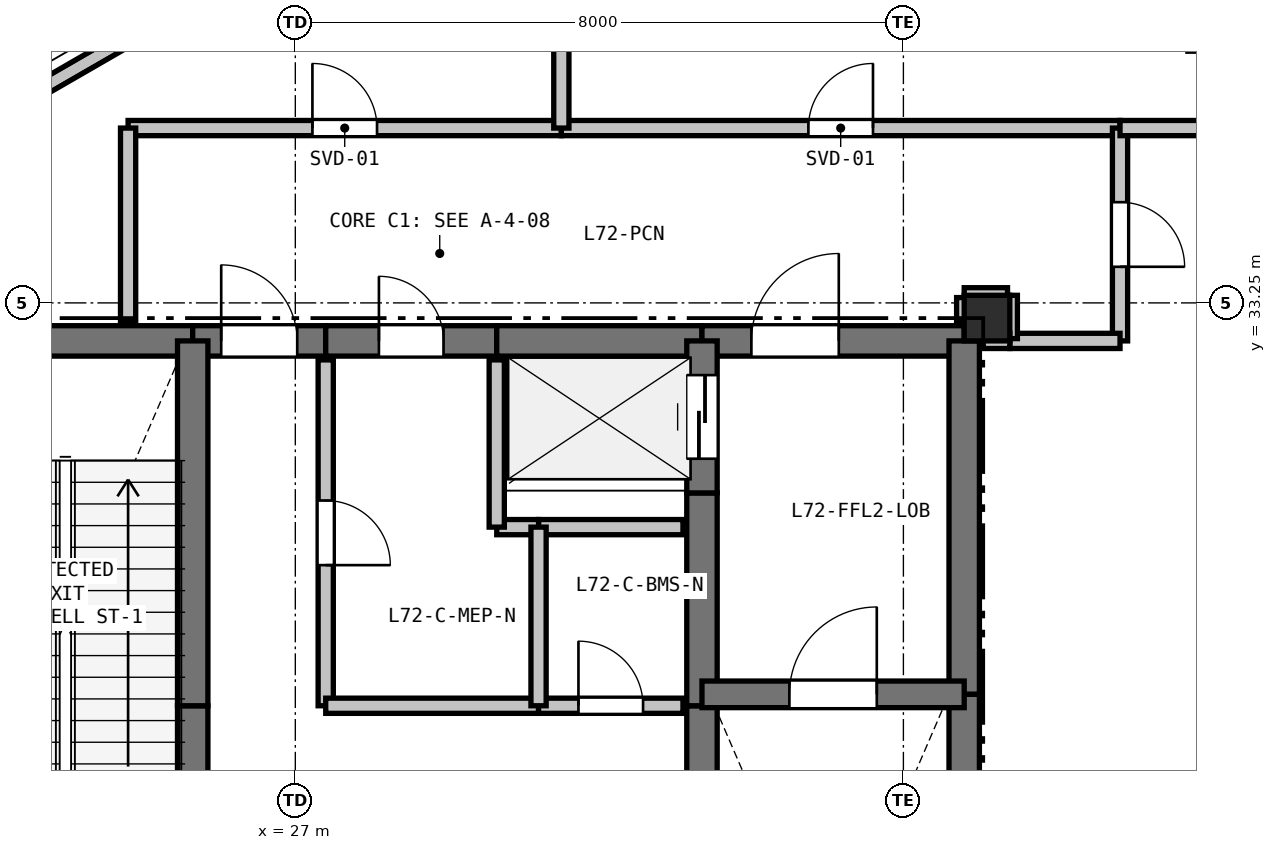
"""IFC4 building model, lengths in metres.
Left out: names, types, materials, properties, quantities, classifications, styles, units other than length and angle.
Written with IfcOpenShell. Run it as: python <this file> out.ifc"""

import sys

from ifc_helpers import new_model, si_unit, direction, frame, frame_2d, origin, origin_2d, place, context, subcontext, project, spatial, rectangle, extrude, element, fill, save


model = new_model("IFC4")
c1 = context("Model", 3, precision=1e-05, world=origin(), true_north=direction((0.0, 1.0)))
c2 = subcontext(c1, "Body", "Model", "MODEL_VIEW")
j1 = project(units=[si_unit("LENGTHUNIT", "METRE"), si_unit("PLANEANGLEUNIT", "RADIAN")], contexts=[c1])
p1 = place(None, origin())
s1 = spatial("IfcSite", under=j1, at=p1, CompositionType="ELEMENT")
p2 = place(p1, origin())
s2 = spatial("IfcBuilding", under=s1, at=p2, CompositionType="ELEMENT")
p3 = place(p2, frame((0.0, 0.0, 258.6)))
s3 = spatial("IfcBuildingStorey", under=s2, at=p3, CompositionType="ELEMENT", Elevation=258.6)
p4 = place(p3, frame((36.1, 33.05, 0.0), z_axis=(0.0, 0.0, 1.0), x_axis=(1.0, 0.0, 0.0)))
e1 = element("IfcColumn", 1, at=p4, inside=s3, PredefinedType="COLUMN", context=c2, shape_type="SweptSolid", body=[
    extrude(rectangle(XDim=0.6, YDim=0.6, at=origin_2d()), origin(), (0.0, 0.0, 1.0), 5.4),
])
p5 = place(p3, frame((20.066, 33.997, 0.0), z_axis=(0.0, 0.0, 1.0), x_axis=(0.866019557082, 0.500010126649, 0.0)))
e2 = element("IfcWall", 2, at=p5, inside=s3, PredefinedType="PARAPET", context=c2, shape_type="SweptSolid", body=[
    extrude(rectangle(XDim=8.228, YDim=0.2, at=frame_2d((4.114, 0.0))), origin(), (0.0, 0.0, 1.0), 0.2),
])
p6 = place(p3, frame((22.2, 32.75, 0.0), z_axis=(0.0, 0.0, 1.0), x_axis=(1.0, 0.0, 0.0)))
e3 = element("IfcWall", 3, at=p6, inside=s3, PredefinedType="SHEAR", context=c2, shape_type="SweptSolid", body=[
    extrude(rectangle(XDim=3.45, YDim=0.4, at=frame_2d((1.725, 0.0))), origin(), (0.0, 0.0, 1.0), 5.08),
])
p7 = place(p3, frame((25.65, 32.75, 0.0), z_axis=(0.0, 0.0, 1.0), x_axis=(1.0, 0.0, 0.0)))
e4 = element("IfcWall", 4, at=p7, inside=s3, PredefinedType="SHEAR", context=c2, shape_type="SweptSolid", body=[
    extrude(rectangle(XDim=1.75, YDim=0.4, at=frame_2d((0.875, 0.0))), origin(), (0.0, 0.0, 1.0), 5.08),
])
p8 = place(p7, frame((0.375, 0.0, 0.0)))
e5 = element("IfcOpeningElement", 5, at=p8, cuts=e4, PredefinedType="OPENING", context=c2, shape_type="SweptSolid", body=[
    extrude(rectangle(XDim=1.0, YDim=2.15, at=frame_2d((0.5, 1.075))), frame((0.0, 0.21, 0.0), z_axis=(0.0, -1.0, 0.0), x_axis=(1.0, 0.0, 0.0)), (0.0, 0.0, 1.0), 0.42),
])
p9 = place(p3, frame((27.4, 32.75, 0.0), z_axis=(0.0, 0.0, 1.0), x_axis=(1.0, 0.0, 0.0)))
e6 = element("IfcWall", 6, at=p9, inside=s3, PredefinedType="SHEAR", context=c2, shape_type="SweptSolid", body=[
    extrude(rectangle(XDim=2.25, YDim=0.4, at=frame_2d((1.125, 0.0))), origin(), (0.0, 0.0, 1.0), 5.08),
])
p10 = place(p9, frame((0.7, 0.0, 0.0)))
e7 = element("IfcOpeningElement", 7, at=p10, cuts=e6, PredefinedType="OPENING", context=c2, shape_type="SweptSolid", body=[
    extrude(rectangle(XDim=0.85, YDim=2.1, at=frame_2d((0.425, 1.05))), frame((0.0, 0.21, 0.0), z_axis=(0.0, -1.0, 0.0), x_axis=(1.0, 0.0, 0.0)), (0.0, 0.0, 1.0), 0.42),
])
p11 = place(p3, frame((29.65, 32.75, 0.0), z_axis=(0.0, 0.0, 1.0), x_axis=(1.0, 0.0, 0.0)))
e8 = element("IfcWall", 8, at=p11, inside=s3, PredefinedType="SHEAR", context=c2, shape_type="SweptSolid", body=[
    extrude(rectangle(XDim=2.7, YDim=0.4, at=frame_2d((1.35, 0.0))), origin(), (0.0, 0.0, 1.0), 5.08),
])
p12 = place(p3, frame((32.35, 32.75, 0.0), z_axis=(0.0, 0.0, 1.0), x_axis=(1.0, 0.0, 0.0)))
e9 = element("IfcWall", 9, at=p12, inside=s3, PredefinedType="SHEAR", context=c2, shape_type="SweptSolid", body=[
    extrude(rectangle(XDim=3.45, YDim=0.4, at=frame_2d((1.725, 0.0))), origin(), (0.0, 0.0, 1.0), 5.08),
])
p13 = place(p12, frame((0.65, 0.0, 0.0)))
e10 = element("IfcOpeningElement", 10, at=p13, cuts=e9, PredefinedType="OPENING", context=c2, shape_type="SweptSolid", body=[
    extrude(rectangle(XDim=1.15, YDim=2.15, at=frame_2d((0.575, 1.075))), frame((0.0, 0.21, 0.0), z_axis=(0.0, -1.0, 0.0), x_axis=(1.0, 0.0, 0.0)), (0.0, 0.0, 1.0), 0.42),
])
p14 = place(p3, frame((35.8, 32.75, 0.0), z_axis=(0.0, 0.0, 1.0), x_axis=(0.0, -1.0, 0.0)))
e11 = element("IfcWall", 11, at=p14, inside=s3, PredefinedType="SHEAR", context=c2, shape_type="SweptSolid", body=[
    extrude(rectangle(XDim=4.65, YDim=0.4, at=frame_2d((2.325, 0.0))), origin(), (0.0, 0.0, 1.0), 5.08),
])
p15 = place(p3, frame((35.8, 28.1, 0.0), z_axis=(0.0, 0.0, 1.0), x_axis=(0.0, -1.0, 0.0)))
e12 = element("IfcWall", 12, at=p15, inside=s3, PredefinedType="SHEAR", context=c2, shape_type="SweptSolid", body=[
    extrude(rectangle(XDim=7.35, YDim=0.4, at=frame_2d((3.675, 0.0))), origin(), (0.0, 0.0, 1.0), 5.08),
])
p16 = place(p3, frame((25.65, 25.55, 0.0), z_axis=(0.0, 0.0, 1.0), x_axis=(0.0, 1.0, 0.0)))
e13 = element("IfcWall", 13, at=p16, inside=s3, PredefinedType="SHEAR", context=c2, shape_type="SweptSolid", body=[
    extrude(rectangle(XDim=2.4, YDim=0.4, at=frame_2d((1.2, 0.0))), origin(), (0.0, 0.0, 1.0), 5.08),
])
p17 = place(p3, frame((25.65, 27.95, 0.0), z_axis=(0.0, 0.0, 1.0), x_axis=(0.0, 1.0, 0.0)))
e14 = element("IfcWall", 14, at=p17, inside=s3, PredefinedType="SHEAR", context=c2, shape_type="SweptSolid", body=[
    extrude(rectangle(XDim=4.8, YDim=0.4, at=frame_2d((2.4, 0.0))), origin(), (0.0, 0.0, 1.0), 5.08),
])
p18 = place(p3, frame((32.35, 25.55, 0.0), z_axis=(0.0, 0.0, 1.0), x_axis=(0.0, 1.0, 0.0)))
e15 = element("IfcWall", 15, at=p18, inside=s3, PredefinedType="SHEAR", context=c2, shape_type="SweptSolid", body=[
    extrude(rectangle(XDim=2.4, YDim=0.4, at=frame_2d((1.2, 0.0))), origin(), (0.0, 0.0, 1.0), 5.08),
])
p19 = place(p3, frame((32.35, 27.95, 0.0), z_axis=(0.0, 0.0, 1.0), x_axis=(0.0, 1.0, 0.0)))
e16 = element("IfcWall", 16, at=p19, inside=s3, PredefinedType="SHEAR", context=c2, shape_type="SweptSolid", body=[
    extrude(rectangle(XDim=2.8, YDim=0.4, at=frame_2d((1.4, 0.0))), origin(), (0.0, 0.0, 1.0), 5.08),
])
p20 = place(p3, frame((32.35, 30.75, 0.0), z_axis=(0.0, 0.0, 1.0), x_axis=(0.0, 1.0, 0.0)))
e17 = element("IfcWall", 17, at=p20, inside=s3, PredefinedType="SHEAR", context=c2, shape_type="SweptSolid", body=[
    extrude(rectangle(XDim=2.0, YDim=0.4, at=frame_2d((1.0, 0.0))), origin(), (0.0, 0.0, 1.0), 5.08),
])
p21 = place(p20, frame((0.45, 0.0, 0.0)))
e18 = element("IfcOpeningElement", 18, at=p21, cuts=e17, PredefinedType="OPENING", context=c2, shape_type="SweptSolid", body=[
    extrude(rectangle(XDim=1.1, YDim=2.15, at=frame_2d((0.55, 1.075))), frame((0.0, 0.21, 0.0), z_axis=(0.0, -1.0, 0.0), x_axis=(1.0, 0.0, 0.0)), (0.0, 0.0, 1.0), 0.42),
])
p22 = place(p3, frame((32.35, 28.1, 0.0), z_axis=(0.0, 0.0, 1.0), x_axis=(1.0, 0.0, 0.0)))
e19 = element("IfcWall", 19, at=p22, inside=s3, PredefinedType="SHEAR", context=c2, shape_type="SweptSolid", body=[
    extrude(rectangle(XDim=3.45, YDim=0.35, at=frame_2d((1.725, 0.0))), origin(), (0.0, 0.0, 1.0), 5.08),
])
p23 = place(p22, frame((1.15, 0.0, 0.0)))
e20 = element("IfcOpeningElement", 20, at=p23, cuts=e19, PredefinedType="OPENING", context=c2, shape_type="SweptSolid", body=[
    extrude(rectangle(XDim=1.15, YDim=2.15, at=frame_2d((0.575, 1.075))), frame((0.0, 0.185, 0.0), z_axis=(0.0, -1.0, 0.0), x_axis=(1.0, 0.0, 0.0)), (0.0, 0.0, 1.0), 0.37),
])
p24 = place(p3, frame((32.1, 30.3, 0.0), z_axis=(0.0, 0.0, 1.0), x_axis=(-1.0, 0.0, 0.0)))
e21 = element("IfcWall", 21, at=p24, inside=s3, PredefinedType="PARTITIONING", context=c2, shape_type="SweptSolid", body=[
    extrude(rectangle(XDim=1.9, YDim=0.2, at=frame_2d((0.95, 0.0))), origin(), (0.0, 0.0, 1.0), 5.08),
])
p25 = place(p3, frame((30.2, 30.3, 0.0), z_axis=(0.0, 0.0, 1.0), x_axis=(-1.0, 0.0, 0.0)))
e22 = element("IfcWall", 22, at=p25, inside=s3, PredefinedType="PARTITIONING", context=c2, shape_type="SweptSolid", body=[
    extrude(rectangle(XDim=0.55, YDim=0.2, at=frame_2d((0.275, 0.0))), origin(), (0.0, 0.0, 1.0), 5.08),
])
p26 = place(p3, frame((29.65, 30.3, 0.0), z_axis=(0.0, 0.0, 1.0), x_axis=(0.0, 1.0, 0.0)))
e23 = element("IfcWall", 23, at=p26, inside=s3, PredefinedType="PARTITIONING", context=c2, shape_type="SweptSolid", body=[
    extrude(rectangle(XDim=2.2, YDim=0.2, at=frame_2d((1.1, 0.0))), origin(), (0.0, 0.0, 1.0), 5.08),
])
p27 = place(p3, frame((27.4, 32.5, 0.0), z_axis=(0.0, 0.0, 1.0), x_axis=(0.0, -1.0, 0.0)))
e24 = element("IfcWall", 24, at=p27, inside=s3, PredefinedType="PARTITIONING", context=c2, shape_type="SweptSolid", body=[
    extrude(rectangle(XDim=4.55, YDim=0.2, at=frame_2d((2.275, 0.0))), origin(), (0.0, 0.0, 1.0), 5.08),
])
p28 = place(p27, frame((1.85, 0.0, 0.0)))
e25 = element("IfcOpeningElement", 25, at=p28, cuts=e24, PredefinedType="OPENING", context=c2, shape_type="SweptSolid", body=[
    extrude(rectangle(XDim=0.85, YDim=2.1, at=frame_2d((0.425, 1.05))), frame((0.0, 0.11, 0.0), z_axis=(0.0, -1.0, 0.0), x_axis=(1.0, 0.0, 0.0)), (0.0, 0.0, 1.0), 0.22),
])
p29 = place(p3, frame((27.4, 27.95, 0.0), z_axis=(0.0, 0.0, 1.0), x_axis=(1.0, 0.0, 0.0)))
e26 = element("IfcWall", 26, at=p29, inside=s3, PredefinedType="PARTITIONING", context=c2, shape_type="SweptSolid", body=[
    extrude(rectangle(XDim=2.8, YDim=0.2, at=frame_2d((1.4, 0.0))), origin(), (0.0, 0.0, 1.0), 5.08),
])
p30 = place(p3, frame((30.2, 27.95, 0.0), z_axis=(0.0, 0.0, 1.0), x_axis=(1.0, 0.0, 0.0)))
e27 = element("IfcWall", 27, at=p30, inside=s3, PredefinedType="PARTITIONING", context=c2, shape_type="SweptSolid", body=[
    extrude(rectangle(XDim=1.9, YDim=0.2, at=frame_2d((0.95, 0.0))), origin(), (0.0, 0.0, 1.0), 5.08),
])
p31 = place(p30, frame((0.525, 0.0, 0.0)))
e28 = element("IfcOpeningElement", 28, at=p31, cuts=e27, PredefinedType="OPENING", context=c2, shape_type="SweptSolid", body=[
    extrude(rectangle(XDim=0.85, YDim=2.1, at=frame_2d((0.425, 1.05))), frame((0.0, 0.11, 0.0), z_axis=(0.0, -1.0, 0.0), x_axis=(1.0, 0.0, 0.0)), (0.0, 0.0, 1.0), 0.22),
])
p32 = place(p3, frame((24.8, 35.55, 0.0), z_axis=(0.0, 0.0, 1.0), x_axis=(1.0, 0.0, 0.0)))
e29 = element("IfcWall", 29, at=p32, inside=s3, PredefinedType="PARTITIONING", context=c2, shape_type="SweptSolid", body=[
    extrude(rectangle(XDim=5.7, YDim=0.2, at=frame_2d((2.85, 0.0))), origin(), (0.0, 0.0, 1.0), 5.08),
])
p33 = place(p32, frame((2.425, 0.0, 0.0)))
e30 = element("IfcOpeningElement", 30, at=p33, cuts=e29, PredefinedType="OPENING", context=c2, shape_type="SweptSolid", body=[
    extrude(rectangle(XDim=0.85, YDim=2.1, at=frame_2d((0.425, 1.05))), frame((0.0, 0.11, 0.0), z_axis=(0.0, -1.0, 0.0), x_axis=(1.0, 0.0, 0.0)), (0.0, 0.0, 1.0), 0.22),
])
p34 = place(p3, frame((30.5, 35.55, 0.0), z_axis=(0.0, 0.0, 1.0), x_axis=(1.0, 0.0, 0.0)))
e31 = element("IfcWall", 31, at=p34, inside=s3, PredefinedType="PARTITIONING", context=c2, shape_type="SweptSolid", body=[
    extrude(rectangle(XDim=7.35, YDim=0.2, at=frame_2d((3.675, 0.0))), origin(), (0.0, 0.0, 1.0), 4.528),
])
p35 = place(p34, frame((3.25, 0.0, 0.0)))
e32 = element("IfcOpeningElement", 32, at=p35, cuts=e31, PredefinedType="OPENING", context=c2, shape_type="SweptSolid", body=[
    extrude(rectangle(XDim=0.85, YDim=2.1, at=frame_2d((0.425, 1.05))), frame((0.0, 0.11, 0.0), z_axis=(0.0, -1.0, 0.0), x_axis=(1.0, 0.0, 0.0)), (0.0, 0.0, 1.0), 0.22),
])
p36 = place(p3, frame((37.85, 35.55, 0.0), z_axis=(0.0, 0.0, 1.0), x_axis=(0.0, -1.0, 0.0)))
e33 = element("IfcWall", 33, at=p36, inside=s3, PredefinedType="PARTITIONING", context=c2, shape_type="SweptSolid", body=[
    extrude(rectangle(XDim=2.8, YDim=0.2, at=frame_2d((1.4, 0.0))), origin(), (0.0, 0.0, 1.0), 4.528),
])
p37 = place(p36, frame((0.975, 0.0, 0.0)))
e34 = element("IfcOpeningElement", 34, at=p37, cuts=e33, PredefinedType="OPENING", context=c2, shape_type="SweptSolid", body=[
    extrude(rectangle(XDim=0.85, YDim=2.1, at=frame_2d((0.425, 1.05))), frame((0.0, 0.11, 0.0), z_axis=(0.0, -1.0, 0.0), x_axis=(1.0, 0.0, 0.0)), (0.0, 0.0, 1.0), 0.22),
])
p38 = place(p3, frame((37.85, 32.75, 0.0), z_axis=(0.0, 0.0, 1.0), x_axis=(-1.0, 0.0, 0.0)))
e35 = element("IfcWall", 35, at=p38, inside=s3, PredefinedType="PARTITIONING", context=c2, shape_type="SweptSolid", body=[
    extrude(rectangle(XDim=1.45, YDim=0.2, at=frame_2d((0.725, 0.0))), origin(), (0.0, 0.0, 1.0), 5.08),
])
for number, where, z_axis, x_axis in (
    (36, (36.4, 32.78, 0.0), (0.0, 0.0, 1.0), (0.0, 1.0, 0.0)),
    (37, (36.37, 33.35, 0.0), (0.0, 0.0, 1.0), (-1.0, 0.0, 0.0)),
):
    element("IfcWall", number, at=place(p3, frame(where, z_axis=z_axis, x_axis=x_axis)), inside=s3, PredefinedType="PARTITIONING", context=c2, shape_type="SweptSolid", body=[
        extrude(rectangle(XDim=0.57, YDim=0.2, at=frame_2d((0.285, 0.0))), origin(), (0.0, 0.0, 1.0), 4.528),
    ])
p39 = place(p3, frame((35.8, 33.32, 0.0), z_axis=(0.0, 0.0, 1.0), x_axis=(0.0, -1.0, 0.0)))
e38 = element("IfcWall", 38, at=p39, inside=s3, PredefinedType="PARTITIONING", context=c2, shape_type="SweptSolid", body=[
    extrude(rectangle(XDim=0.32, YDim=0.2, at=frame_2d((0.16, 0.0))), origin(), (0.0, 0.0, 1.0), 4.605),
])
p40 = place(p3, frame((24.8, 33.0, 0.0), z_axis=(0.0, 0.0, 1.0), x_axis=(0.0, 1.0, 0.0)))
e39 = element("IfcWall", 39, at=p40, inside=s3, PredefinedType="PARTITIONING", context=c2, shape_type="SweptSolid", body=[
    extrude(rectangle(XDim=2.55, YDim=0.2, at=frame_2d((1.275, 0.0))), origin(), (0.0, 0.0, 1.0), 4.605),
])
p41 = place(p3, frame((30.2, 30.3, 0.0), z_axis=(0.0, 0.0, 1.0), x_axis=(0.0, -1.0, 0.0)))
e40 = element("IfcWall", 40, at=p41, inside=s3, PredefinedType="PARTITIONING", context=c2, shape_type="SweptSolid", body=[
    extrude(rectangle(XDim=2.35, YDim=0.2, at=frame_2d((1.175, 0.0))), origin(), (0.0, 0.0, 1.0), 5.08),
])
p42 = place(p3, frame((39.693, 35.55, 0.0), z_axis=(0.0, 0.0, 1.0), x_axis=(-1.0, 0.0, 0.0)))
e41 = element("IfcWall", 41, at=p42, inside=s3, PredefinedType="PARTITIONING", context=c2, shape_type="SweptSolid", body=[
    extrude(rectangle(XDim=1.843, YDim=0.2, at=frame_2d((0.921, 0.0))), origin(), (0.0, 0.0, 1.0), 4.528),
])
p43 = place(p3, frame((30.5, 35.55, 0.0), z_axis=(0.0, 0.0, 1.0), x_axis=(0.0, 1.0, 0.0)))
e42 = element("IfcWall", 42, at=p43, inside=s3, PredefinedType="PARTITIONING", context=c2, shape_type="SweptSolid", body=[
    extrude(rectangle(XDim=4.413, YDim=0.2, at=frame_2d((2.207, 0.0))), origin(), (0.0, 0.0, 1.0), 4.805),
])
p44 = place(p3, frame((36.05, 32.75, 0.0), z_axis=(0.0, 0.0, 1.0), x_axis=(1.0, 0.0, 0.0)))
e43 = element("IfcWall", 43, at=p44, inside=s3, PredefinedType="PARTITIONING", context=c2, shape_type="SweptSolid", body=[
    extrude(rectangle(XDim=0.35, YDim=0.2, at=frame_2d((0.175, 0.0))), origin(), (0.0, 0.0, 1.0), 4.605),
])
p45 = place(p8, origin())
e44 = element("IfcDoor", 44, at=p45, inside=s3, OperationType="SINGLE_SWING_LEFT", PredefinedType="DOOR", context=c2, shape_type="SweptSolid", body=[
    extrude(rectangle(XDim=1.0, YDim=2.15, at=frame_2d((0.5, 1.075))), frame((0.0, 0.025, 0.0), z_axis=(0.0, -1.0, 0.0), x_axis=(1.0, 0.0, 0.0)), (0.0, 0.0, 1.0), 0.05),
])
fill(e5, e44)
p46 = place(p21, origin())
e45 = element("IfcDoor", 45, at=p46, inside=s3, OperationType="SLIDING_TO_LEFT", PredefinedType="DOOR", context=c2, shape_type="SweptSolid", body=[
    extrude(rectangle(XDim=1.1, YDim=2.15, at=frame_2d((0.55, 1.075))), frame((0.0, 0.025, 0.0), z_axis=(0.0, -1.0, 0.0), x_axis=(1.0, 0.0, 0.0)), (0.0, 0.0, 1.0), 0.05),
])
fill(e18, e45)
p47 = place(p23, origin())
e46 = element("IfcDoor", 46, at=p47, inside=s3, OperationType="SINGLE_SWING_RIGHT", PredefinedType="DOOR", context=c2, shape_type="SweptSolid", body=[
    extrude(rectangle(XDim=1.15, YDim=2.15, at=frame_2d((0.575, 1.075))), frame((0.0, 0.025, 0.0), z_axis=(0.0, -1.0, 0.0), x_axis=(1.0, 0.0, 0.0)), (0.0, 0.0, 1.0), 0.05),
])
fill(e20, e46)
p48 = place(p13, origin())
e47 = element("IfcDoor", 47, at=p48, inside=s3, OperationType="SINGLE_SWING_RIGHT", PredefinedType="DOOR", context=c2, shape_type="SweptSolid", body=[
    extrude(rectangle(XDim=1.15, YDim=2.15, at=frame_2d((0.575, 1.075))), frame((0.0, 0.025, 0.0), z_axis=(0.0, -1.0, 0.0), x_axis=(1.0, 0.0, 0.0)), (0.0, 0.0, 1.0), 0.05),
])
fill(e10, e47)
p49 = place(p28, origin())
e48 = element("IfcDoor", 48, at=p49, inside=s3, OperationType="SINGLE_SWING_RIGHT", PredefinedType="DOOR", context=c2, shape_type="SweptSolid", body=[
    extrude(rectangle(XDim=0.85, YDim=2.1, at=frame_2d((0.425, 1.05))), frame((0.0, 0.025, 0.0), z_axis=(0.0, -1.0, 0.0), x_axis=(1.0, 0.0, 0.0)), (0.0, 0.0, 1.0), 0.05),
])
fill(e25, e48)
p50 = place(p31, origin())
e49 = element("IfcDoor", 49, at=p50, inside=s3, OperationType="SINGLE_SWING_LEFT", PredefinedType="DOOR", context=c2, shape_type="SweptSolid", body=[
    extrude(rectangle(XDim=0.85, YDim=2.1, at=frame_2d((0.425, 1.05))), frame((0.0, 0.025, 0.0), z_axis=(0.0, -1.0, 0.0), x_axis=(1.0, 0.0, 0.0)), (0.0, 0.0, 1.0), 0.05),
])
fill(e28, e49)
p51 = place(p10, origin())
e50 = element("IfcDoor", 50, at=p51, inside=s3, OperationType="SINGLE_SWING_LEFT", PredefinedType="DOOR", context=c2, shape_type="SweptSolid", body=[
    extrude(rectangle(XDim=0.85, YDim=2.1, at=frame_2d((0.425, 1.05))), frame((0.0, 0.025, 0.0), z_axis=(0.0, -1.0, 0.0), x_axis=(1.0, 0.0, 0.0)), (0.0, 0.0, 1.0), 0.05),
])
fill(e7, e50)
p52 = place(p35, origin())
e51 = element("IfcDoor", 51, at=p52, inside=s3, OperationType="SINGLE_SWING_RIGHT", PredefinedType="DOOR", context=c2, shape_type="SweptSolid", body=[
    extrude(rectangle(XDim=0.85, YDim=2.1, at=frame_2d((0.425, 1.05))), frame((0.0, 0.025, 0.0), z_axis=(0.0, -1.0, 0.0), x_axis=(1.0, 0.0, 0.0)), (0.0, 0.0, 1.0), 0.05),
])
fill(e32, e51)
p53 = place(p33, origin())
e52 = element("IfcDoor", 52, at=p53, inside=s3, OperationType="SINGLE_SWING_LEFT", PredefinedType="DOOR", context=c2, shape_type="SweptSolid", body=[
    extrude(rectangle(XDim=0.85, YDim=2.1, at=frame_2d((0.425, 1.05))), frame((0.0, 0.025, 0.0), z_axis=(0.0, -1.0, 0.0), x_axis=(1.0, 0.0, 0.0)), (0.0, 0.0, 1.0), 0.05),
])
fill(e30, e52)
p54 = place(p37, origin())
e53 = element("IfcDoor", 53, at=p54, inside=s3, OperationType="SINGLE_SWING_RIGHT", PredefinedType="DOOR", context=c2, shape_type="SweptSolid", body=[
    extrude(rectangle(XDim=0.85, YDim=2.1, at=frame_2d((0.425, 1.05))), frame((0.0, 0.025, 0.0), z_axis=(0.0, -1.0, 0.0), x_axis=(1.0, 0.0, 0.0)), (0.0, 0.0, 1.0), 0.05),
])
fill(e34, e53)
save(model, sys.argv[1])
